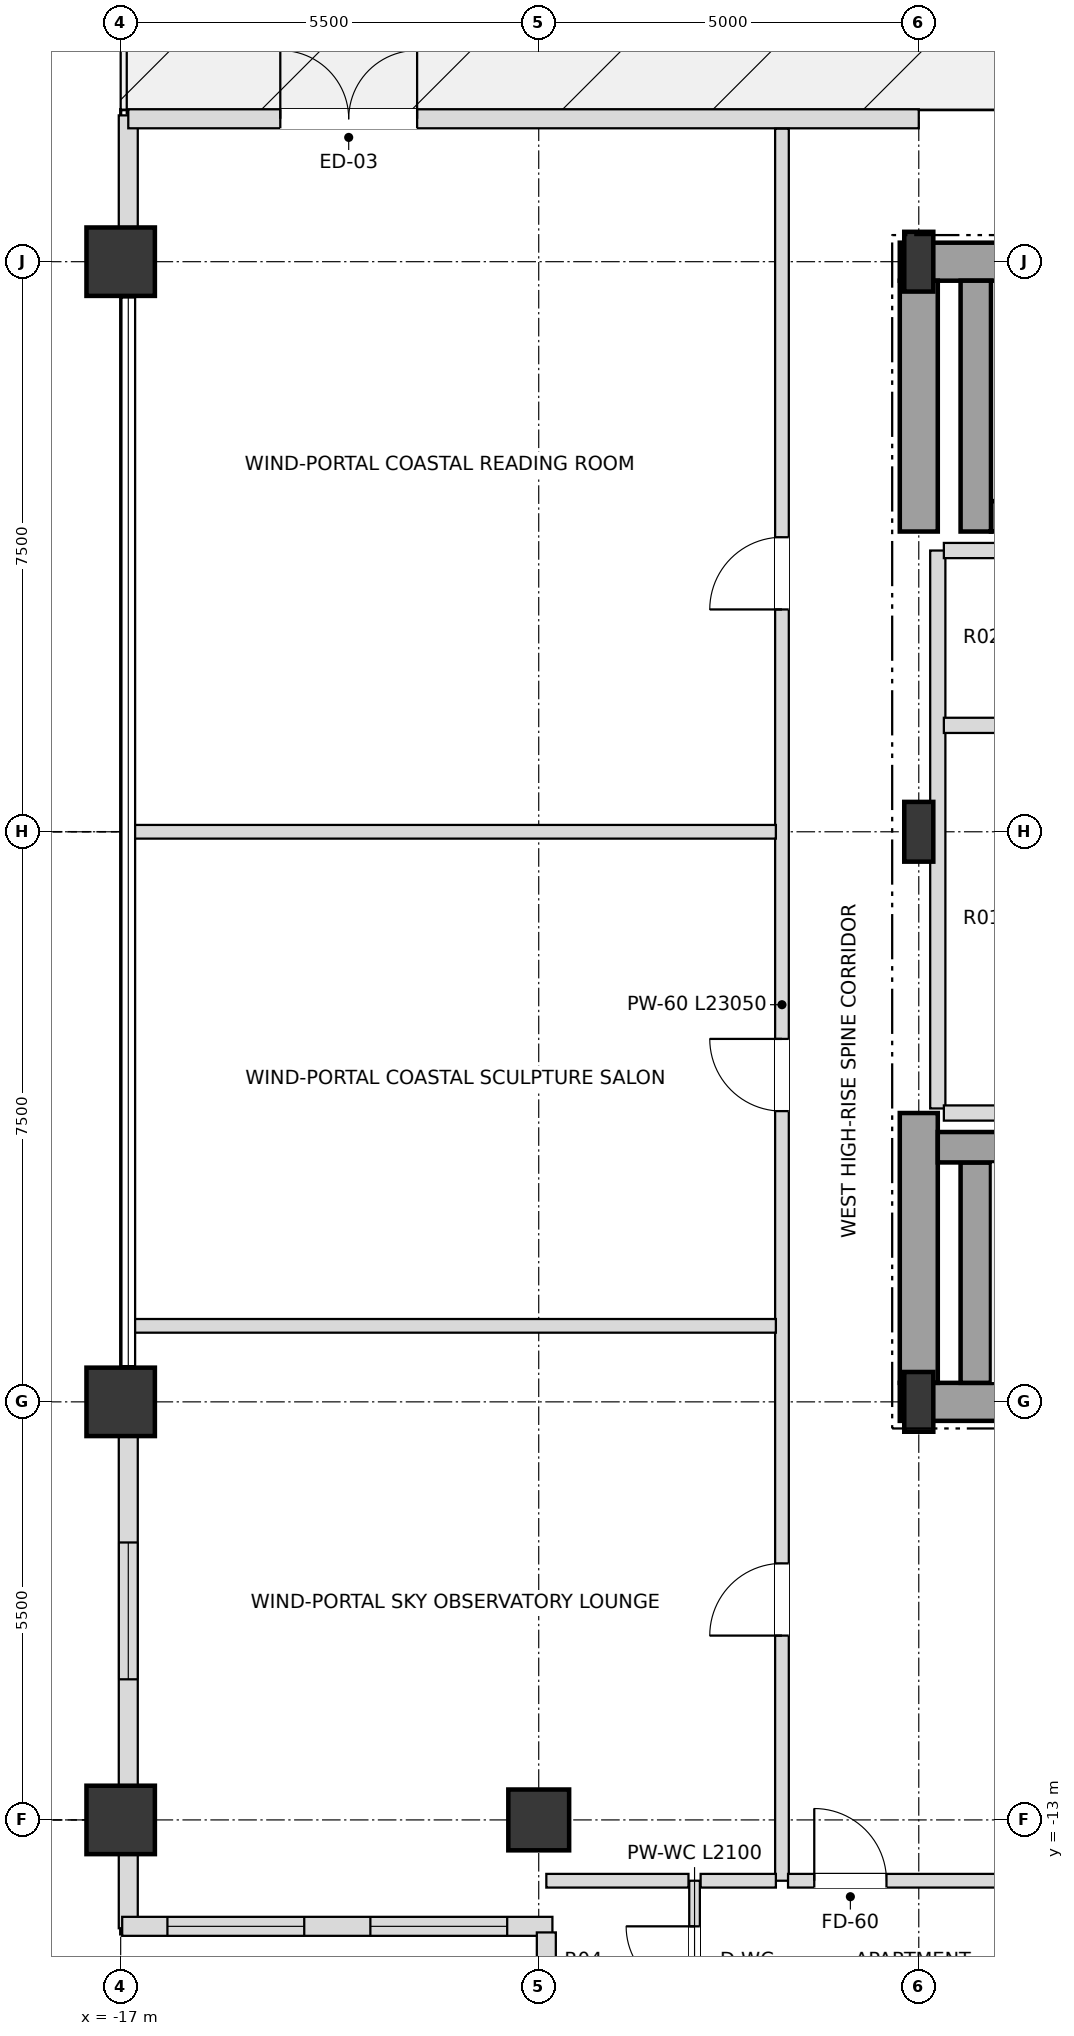
"""IFC4 building model, lengths in metres.
Left out: names, types, materials, properties, quantities, classifications, styles, units other than length and angle.
Written with IfcOpenShell. Run it as: python <this file> out.ifc"""

import sys

from ifc_helpers import new_model, si_unit, direction, frame, frame_2d, origin, origin_2d, place, context, subcontext, project, spatial, rectangle, i_section, extrude, element, fill, save


model = new_model("IFC4")
c1 = context("Model", 3, precision=1e-05, world=origin(), true_north=direction((0.0, 1.0)))
c2 = subcontext(c1, "Body", "Model", "MODEL_VIEW")
j1 = project(units=[si_unit("LENGTHUNIT", "METRE"), si_unit("PLANEANGLEUNIT", "RADIAN")], contexts=[c1])
p1 = place(None, origin())
s1 = spatial("IfcSite", under=j1, at=p1, CompositionType="ELEMENT")
p2 = place(p1, origin())
s2 = spatial("IfcBuilding", under=s1, at=p2, CompositionType="ELEMENT")
p3 = place(p2, frame((0.0, 0.0, 261.9)))
s3 = spatial("IfcBuildingStorey", under=s2, at=p3, CompositionType="ELEMENT", Elevation=261.9)
for number, where, z_axis, x_axis in (
    (1, (-6.5, -7.5, 0.0), (0.0, 0.0, 1.0), (1.0, 0.0, 0.0)),
    (2, (-6.5, 0.0, 0.0), (0.0, 0.0, 1.0), (1.0, 0.0, 0.0)),
    (3, (-6.5, 7.5, 0.0), (0.0, 0.0, 1.0), (1.0, 0.0, 0.0)),
):
    element("IfcColumn", number, at=place(p3, frame(where, z_axis=z_axis, x_axis=x_axis)), inside=s3, PredefinedType="COLUMN", context=c2, shape_type="SweptSolid", body=[
        extrude(i_section(OverallWidth=0.382, OverallDepth=0.786, WebThickness=0.02, FlangeThickness=0.033, at=origin_2d()), origin(), (0.0, 0.0, 1.0), 3.6),
    ])
for number, where, z_axis, x_axis in (
    (4, (-17.0, 7.5, 0.0), (0.0, 0.0, 1.0), (1.0, 0.0, 0.0)),
    (5, (-17.0, -7.5, 0.0), (0.0, 0.0, 1.0), (1.0, 0.0, 0.0)),
    (6, (-17.0, -13.0, 0.0), (0.0, 0.0, 1.0), (1.0, 0.0, 0.0)),
):
    element("IfcColumn", number, at=place(p3, frame(where, z_axis=z_axis, x_axis=x_axis)), inside=s3, PredefinedType="USERDEFINED", context=c2, shape_type="SweptSolid", body=[
        extrude(rectangle(XDim=0.9, YDim=0.9, at=origin_2d()), origin(), (0.0, 0.0, 1.0), 3.6),
    ])
p4 = place(p3, frame((-11.5, -13.0, 0.0), z_axis=(0.0, 0.0, 1.0), x_axis=(1.0, 0.0, 0.0)))
e7 = element("IfcColumn", 7, at=p4, inside=s3, PredefinedType="COLUMN", context=c2, shape_type="SweptSolid", body=[
    extrude(rectangle(XDim=0.8, YDim=0.8, at=origin_2d()), origin(), (0.0, 0.0, 1.0), 3.6),
])
p5 = place(p3, frame((-16.9, 9.425, 0.0), z_axis=(0.0, 0.0, 1.0), x_axis=(0.0, -1.0, 0.0)))
e8 = element("IfcWall", 8, at=p5, inside=s3, PredefinedType="SOLIDWALL", context=c2, shape_type="SweptSolid", body=[
    extrude(rectangle(XDim=1.48, YDim=0.25, at=frame_2d((0.74, 0.0))), origin(), (0.0, 0.0, 1.0), 2.748),
])
p6 = place(p3, frame((-16.9, -7.945, 0.0), z_axis=(0.0, 0.0, 1.0), x_axis=(0.0, -1.0, 0.0)))
e9 = element("IfcWall", 9, at=p6, inside=s3, PredefinedType="SOLIDWALL", context=c2, shape_type="SweptSolid", body=[
    extrude(rectangle(XDim=4.61, YDim=0.25, at=frame_2d((2.305, 0.0))), origin(), (0.0, 0.0, 1.0), 2.748),
])
p7 = place(p6, frame((1.405, 0.0, 0.72)))
e10 = element("IfcOpeningElement", 10, at=p7, cuts=e9, PredefinedType="OPENING", context=c2, shape_type="SweptSolid", body=[
    extrude(rectangle(XDim=1.8, YDim=1.68, at=frame_2d((0.9, 0.84))), frame((0.0, 0.135, 0.0), z_axis=(0.0, -1.0, 0.0), x_axis=(1.0, 0.0, 0.0)), (0.0, 0.0, 1.0), 0.27),
])
p8 = place(p3, frame((-16.9, -13.445, 0.0), z_axis=(0.0, 0.0, 1.0), x_axis=(0.0, -1.0, 0.0)))
e11 = element("IfcWall", 11, at=p8, inside=s3, PredefinedType="SOLIDWALL", context=c2, shape_type="SweptSolid", body=[
    extrude(rectangle(XDim=0.98, YDim=0.25, at=frame_2d((0.49, 0.0))), origin(), (0.0, 0.0, 1.0), 2.748),
])
p9 = place(p3, frame((-16.9, 9.38, 0.0), z_axis=(0.0, 0.0, 1.0), x_axis=(1.0, 0.0, 0.0)))
e12 = element("IfcWall", 12, at=p9, inside=s3, PredefinedType="SOLIDWALL", context=c2, shape_type="SweptSolid", body=[
    extrude(rectangle(XDim=10.4, YDim=0.25, at=frame_2d((5.2, 0.0))), origin(), (0.0, 0.0, 1.0), 3.38),
])
p10 = place(p9, frame((2.0, 0.0, 0.0)))
e13 = element("IfcOpeningElement", 13, at=p10, cuts=e12, PredefinedType="OPENING", context=c2, shape_type="SweptSolid", body=[
    extrude(rectangle(XDim=1.8, YDim=2.3, at=frame_2d((0.9, 1.15))), frame((0.0, 0.135, 0.0), z_axis=(0.0, -1.0, 0.0), x_axis=(1.0, 0.0, 0.0)), (0.0, 0.0, 1.0), 0.27),
])
p11 = place(p3, frame((-16.98, -14.4, 0.0), z_axis=(0.0, 0.0, 1.0), x_axis=(1.0, 0.0, 0.0)))
e14 = element("IfcWall", 14, at=p11, inside=s3, PredefinedType="SOLIDWALL", context=c2, shape_type="SweptSolid", body=[
    extrude(rectangle(XDim=5.66, YDim=0.25, at=frame_2d((2.83, 0.0))), origin(), (0.0, 0.0, 1.0), 2.748),
])
p12 = place(p11, frame((0.595, 0.0, 0.72)))
e15 = element("IfcOpeningElement", 15, at=p12, cuts=e14, PredefinedType="OPENING", context=c2, shape_type="SweptSolid", body=[
    extrude(rectangle(XDim=1.8, YDim=1.68, at=frame_2d((0.9, 0.84))), frame((0.0, 0.135, 0.0), z_axis=(0.0, -1.0, 0.0), x_axis=(1.0, 0.0, 0.0)), (0.0, 0.0, 1.0), 0.27),
])
p13 = place(p11, frame((3.265, 0.0, 0.72)))
e16 = element("IfcOpeningElement", 16, at=p13, cuts=e14, PredefinedType="OPENING", context=c2, shape_type="SweptSolid", body=[
    extrude(rectangle(XDim=1.8, YDim=1.68, at=frame_2d((0.9, 0.84))), frame((0.0, 0.135, 0.0), z_axis=(0.0, -1.0, 0.0), x_axis=(1.0, 0.0, 0.0)), (0.0, 0.0, 1.0), 0.27),
])
p14 = place(p3, frame((-11.4, -14.48, 0.0), z_axis=(0.0, 0.0, 1.0), x_axis=(0.0, -1.0, 0.0)))
e17 = element("IfcWall", 17, at=p14, inside=s3, PredefinedType="SOLIDWALL", context=c2, shape_type="SweptSolid", body=[
    extrude(rectangle(XDim=5.34, YDim=0.25, at=frame_2d((2.67, 0.0))), origin(), (0.0, 0.0, 1.0), 2.748),
])
p15 = place(p14, frame((0.33, 0.0, 0.72)))
e18 = element("IfcOpeningElement", 18, at=p15, cuts=e17, PredefinedType="OPENING", context=c2, shape_type="SweptSolid", body=[
    extrude(rectangle(XDim=0.76, YDim=1.68, at=frame_2d((0.38, 0.84))), frame((0.0, 0.135, 0.0), z_axis=(0.0, -1.0, 0.0), x_axis=(1.0, 0.0, 0.0)), (0.0, 0.0, 1.0), 0.27),
])
p16 = place(p14, frame((2.325, 0.0, 0.72)))
e19 = element("IfcOpeningElement", 19, at=p16, cuts=e17, PredefinedType="OPENING", context=c2, shape_type="SweptSolid", body=[
    extrude(rectangle(XDim=1.8, YDim=1.68, at=frame_2d((0.9, 0.84))), frame((0.0, 0.135, 0.0), z_axis=(0.0, -1.0, 0.0), x_axis=(1.0, 0.0, 0.0)), (0.0, 0.0, 1.0), 0.27),
])
p17 = place(p3, frame((-6.75, -7.5, 0.0), z_axis=(0.0, 0.0, 1.0), x_axis=(1.0, 0.0, 0.0)))
e20 = element("IfcWall", 20, at=p17, inside=s3, PredefinedType="SHEAR", context=c2, shape_type="SweptSolid", body=[
    extrude(rectangle(XDim=6.75, YDim=0.5, at=frame_2d((3.375, 0.0))), origin(), (0.0, 0.0, 1.0), 3.38),
])
p18 = place(p3, frame((-6.75, 7.5, 0.0), z_axis=(0.0, 0.0, 1.0), x_axis=(1.0, 0.0, 0.0)))
e21 = element("IfcWall", 21, at=p18, inside=s3, PredefinedType="SHEAR", context=c2, shape_type="SweptSolid", body=[
    extrude(rectangle(XDim=6.75, YDim=0.5, at=frame_2d((3.375, 0.0))), origin(), (0.0, 0.0, 1.0), 3.38),
])
p19 = place(p18, frame((1.65, 0.0, 0.0)))
e22 = element("IfcOpeningElement", 22, at=p19, cuts=e21, PredefinedType="OPENING", context=c2, shape_type="SweptSolid", body=[
    extrude(rectangle(XDim=1.05, YDim=2.15, at=frame_2d((0.525, 1.075))), frame((0.0, 0.26, 0.0), z_axis=(0.0, -1.0, 0.0), x_axis=(1.0, 0.0, 0.0)), (0.0, 0.0, 1.0), 0.52),
])
p20 = place(p3, frame((-6.5, -7.25, 0.0), z_axis=(0.0, 0.0, 1.0), x_axis=(0.0, 1.0, 0.0)))
e23 = element("IfcWall", 23, at=p20, inside=s3, PredefinedType="SHEAR", context=c2, shape_type="SweptSolid", body=[
    extrude(rectangle(XDim=3.55, YDim=0.5, at=frame_2d((1.775, 0.0))), origin(), (0.0, 0.0, 1.0), 3.38),
])
p21 = place(p3, frame((-6.5, 3.95, 0.0), z_axis=(0.0, 0.0, 1.0), x_axis=(0.0, 1.0, 0.0)))
e24 = element("IfcWall", 24, at=p21, inside=s3, PredefinedType="SHEAR", context=c2, shape_type="SweptSolid", body=[
    extrude(rectangle(XDim=3.3, YDim=0.5, at=frame_2d((1.65, 0.0))), origin(), (0.0, 0.0, 1.0), 3.38),
])
p22 = place(p3, frame((-5.75, -7.25, 0.0), z_axis=(0.0, 0.0, 1.0), x_axis=(0.0, 1.0, 0.0)))
e25 = element("IfcWall", 25, at=p22, inside=s3, PredefinedType="SHEAR", context=c2, shape_type="SweptSolid", body=[
    extrude(rectangle(XDim=2.9, YDim=0.4, at=frame_2d((1.45, 0.0))), origin(), (0.0, 0.0, 1.0), 3.38),
])
p23 = place(p3, frame((-6.25, -4.15, 0.0), z_axis=(0.0, 0.0, 1.0), x_axis=(1.0, 0.0, 0.0)))
e26 = element("IfcWall", 26, at=p23, inside=s3, PredefinedType="SHEAR", context=c2, shape_type="SweptSolid", body=[
    extrude(rectangle(XDim=7.78, YDim=0.4, at=frame_2d((3.89, 0.0))), origin(), (0.0, 0.0, 1.0), 3.38),
])
p24 = place(p3, frame((-5.55, 4.15, 0.0), z_axis=(0.0, 0.0, 1.0), x_axis=(1.0, 0.0, 0.0)))
e27 = element("IfcWall", 27, at=p24, inside=s3, PredefinedType="SHEAR", context=c2, shape_type="SweptSolid", body=[
    extrude(rectangle(XDim=7.08, YDim=0.4, at=frame_2d((3.54, 0.0))), origin(), (0.0, 0.0, 1.0), 3.38),
])
p25 = place(p3, frame((-5.75, 3.95, 0.0), z_axis=(0.0, 0.0, 1.0), x_axis=(0.0, 1.0, 0.0)))
e28 = element("IfcWall", 28, at=p25, inside=s3, PredefinedType="SHEAR", context=c2, shape_type="SweptSolid", body=[
    extrude(rectangle(XDim=3.3, YDim=0.4, at=frame_2d((1.65, 0.0))), origin(), (0.0, 0.0, 1.0), 3.38),
])
p26 = place(p3, frame((-9.45, -15.9, 0.0), z_axis=(0.0, 0.0, 1.0), x_axis=(0.0, 1.0, 0.0)))
e29 = element("IfcWall", 29, at=p26, inside=s3, PredefinedType="PARTITIONING", context=c2, shape_type="SweptSolid", body=[
    extrude(rectangle(XDim=2.1, YDim=0.14, at=frame_2d((1.05, 0.0))), origin(), (0.0, 0.0, 1.0), 3.38),
])
p27 = place(p26, frame((0.6, 0.0, 0.0)))
e30 = element("IfcOpeningElement", 30, at=p27, cuts=e29, PredefinedType="OPENING", context=c2, shape_type="SweptSolid", body=[
    extrude(rectangle(XDim=0.9, YDim=2.1, at=frame_2d((0.45, 1.05))), frame((0.0, 0.08, 0.0), z_axis=(0.0, -1.0, 0.0), x_axis=(1.0, 0.0, 0.0)), (0.0, 0.0, 1.0), 0.16),
])
p28 = place(p3, frame((-8.3, -13.8, 0.0), z_axis=(0.0, 0.0, 1.0), x_axis=(0.0, 1.0, 0.0)))
e31 = element("IfcWall", 31, at=p28, inside=s3, PredefinedType="PARTITIONING", context=c2, shape_type="SweptSolid", body=[
    extrude(rectangle(XDim=23.05, YDim=0.18, at=frame_2d((11.525, 0.0))), origin(), (0.0, 0.0, 1.0), 2.826),
])
p29 = place(p28, frame((3.225, 0.0, 0.0)))
e32 = element("IfcOpeningElement", 32, at=p29, cuts=e31, PredefinedType="OPENING", context=c2, shape_type="SweptSolid", body=[
    extrude(rectangle(XDim=0.95, YDim=2.15, at=frame_2d((0.475, 1.075))), frame((0.0, 0.1, 0.0), z_axis=(0.0, -1.0, 0.0), x_axis=(1.0, 0.0, 0.0)), (0.0, 0.0, 1.0), 0.2),
])
p30 = place(p28, frame((10.125, 0.0, 0.0)))
e33 = element("IfcOpeningElement", 33, at=p30, cuts=e31, PredefinedType="OPENING", context=c2, shape_type="SweptSolid", body=[
    extrude(rectangle(XDim=0.95, YDim=2.15, at=frame_2d((0.475, 1.075))), frame((0.0, 0.1, 0.0), z_axis=(0.0, -1.0, 0.0), x_axis=(1.0, 0.0, 0.0)), (0.0, 0.0, 1.0), 0.2),
])
p31 = place(p28, frame((16.725, 0.0, 0.0)))
e34 = element("IfcOpeningElement", 34, at=p31, cuts=e31, PredefinedType="OPENING", context=c2, shape_type="SweptSolid", body=[
    extrude(rectangle(XDim=0.95, YDim=2.15, at=frame_2d((0.475, 1.075))), frame((0.0, 0.1, 0.0), z_axis=(0.0, -1.0, 0.0), x_axis=(1.0, 0.0, 0.0)), (0.0, 0.0, 1.0), 0.2),
])
p32 = place(p3, frame((-6.25, -3.64, 0.0), z_axis=(0.0, 0.0, 1.0), x_axis=(0.0, 1.0, 0.0)))
e35 = element("IfcWall", 35, at=p32, inside=s3, PredefinedType="SOLIDWALL", context=c2, shape_type="SweptSolid", body=[
    extrude(rectangle(XDim=7.34, YDim=0.2, at=frame_2d((3.67, 0.0))), origin(), (0.0, 0.0, 1.0), 3.38),
])
p33 = place(p3, frame((-11.4, -13.8, 0.0), z_axis=(0.0, 0.0, 1.0), x_axis=(1.0, 0.0, 0.0)))
e36 = element("IfcWall", 36, at=p33, inside=s3, PredefinedType="PARTITIONING", context=c2, shape_type="SweptSolid", body=[
    extrude(rectangle(XDim=1.87, YDim=0.18, at=frame_2d((0.935, 0.0))), origin(), (0.0, 0.0, 1.0), 3.38),
])
p34 = place(p3, frame((-9.37, -13.8, 0.0), z_axis=(0.0, 0.0, 1.0), x_axis=(1.0, 0.0, 0.0)))
e37 = element("IfcWall", 37, at=p34, inside=s3, PredefinedType="PARTITIONING", context=c2, shape_type="SweptSolid", body=[
    extrude(rectangle(XDim=0.99, YDim=0.18, at=frame_2d((0.495, 0.0))), origin(), (0.0, 0.0, 1.0), 3.38),
])
p35 = place(p3, frame((-8.22, -13.8, 0.0), z_axis=(0.0, 0.0, 1.0), x_axis=(1.0, 0.0, 0.0)))
e38 = element("IfcWall", 38, at=p35, inside=s3, PredefinedType="PARTITIONING", context=c2, shape_type="SweptSolid", body=[
    extrude(rectangle(XDim=4.44, YDim=0.18, at=frame_2d((2.22, 0.0))), origin(), (0.0, 0.0, 1.0), 2.826),
])
p36 = place(p35, frame((0.345, 0.0, 0.0)))
e39 = element("IfcOpeningElement", 39, at=p36, cuts=e38, PredefinedType="OPENING", context=c2, shape_type="SweptSolid", body=[
    extrude(rectangle(XDim=0.95, YDim=2.15, at=frame_2d((0.475, 1.075))), frame((0.0, 0.1, 0.0), z_axis=(0.0, -1.0, 0.0), x_axis=(1.0, 0.0, 0.0)), (0.0, 0.0, 1.0), 0.2),
])
p37 = place(p3, frame((-16.82, -6.5, 0.0), z_axis=(0.0, 0.0, 1.0), x_axis=(1.0, 0.0, 0.0)))
e40 = element("IfcWall", 40, at=p37, inside=s3, PredefinedType="PARTITIONING", context=c2, shape_type="SweptSolid", body=[
    extrude(rectangle(XDim=8.44, YDim=0.18, at=frame_2d((4.22, 0.0))), origin(), (0.0, 0.0, 1.0), 3.018),
])
p38 = place(p3, frame((-6.17, -3.7, 0.0), z_axis=(0.0, 0.0, 1.0), x_axis=(1.0, 0.0, 0.0)))
e41 = element("IfcWall", 41, at=p38, inside=s3, PredefinedType="SOLIDWALL", context=c2, shape_type="SweptSolid", body=[
    extrude(rectangle(XDim=1.94, YDim=0.2, at=frame_2d((0.97, 0.0))), origin(), (0.0, 0.0, 1.0), 3.38),
])
p39 = place(p3, frame((-16.82, 0.0, 0.0), z_axis=(0.0, 0.0, 1.0), x_axis=(1.0, 0.0, 0.0)))
e42 = element("IfcWall", 42, at=p39, inside=s3, PredefinedType="PARTITIONING", context=c2, shape_type="SweptSolid", body=[
    extrude(rectangle(XDim=8.44, YDim=0.18, at=frame_2d((4.22, 0.0))), origin(), (0.0, 0.0, 1.0), 3.018),
])
for number, where, z_axis, x_axis in (
    (43, (-6.17, 1.4, 0.0), (0.0, 0.0, 1.0), (1.0, 0.0, 0.0)),
    (44, (-6.17, 3.7, 0.0), (0.0, 0.0, 1.0), (1.0, 0.0, 0.0)),
):
    element("IfcWall", number, at=place(p3, frame(where, z_axis=z_axis, x_axis=x_axis)), inside=s3, PredefinedType="SOLIDWALL", context=c2, shape_type="SweptSolid", body=[
        extrude(rectangle(XDim=1.94, YDim=0.2, at=frame_2d((0.97, 0.0))), origin(), (0.0, 0.0, 1.0), 3.38),
    ])
p40 = place(p7, origin())
e45 = element("IfcWindow", 45, at=p40, inside=s3, PartitioningType="SINGLE_PANEL", PredefinedType="WINDOW", context=c2, shape_type="SweptSolid", body=[
    extrude(rectangle(XDim=1.8, YDim=1.68, at=frame_2d((0.9, 0.84))), frame((0.0, 0.03, 0.0), z_axis=(0.0, -1.0, 0.0), x_axis=(1.0, 0.0, 0.0)), (0.0, 0.0, 1.0), 0.06),
])
fill(e10, e45)
p41 = place(p10, origin())
e46 = element("IfcDoor", 46, at=p41, inside=s3, OperationType="DOUBLE_DOOR_SINGLE_SWING", PredefinedType="DOOR", context=c2, shape_type="SweptSolid", body=[
    extrude(rectangle(XDim=1.8, YDim=2.3, at=frame_2d((0.9, 1.15))), frame((0.0, 0.025, 0.0), z_axis=(0.0, -1.0, 0.0), x_axis=(1.0, 0.0, 0.0)), (0.0, 0.0, 1.0), 0.05),
])
fill(e13, e46)
p42 = place(p12, origin())
e47 = element("IfcWindow", 47, at=p42, inside=s3, PartitioningType="SINGLE_PANEL", PredefinedType="WINDOW", context=c2, shape_type="SweptSolid", body=[
    extrude(rectangle(XDim=1.8, YDim=1.68, at=frame_2d((0.9, 0.84))), frame((0.0, 0.03, 0.0), z_axis=(0.0, -1.0, 0.0), x_axis=(1.0, 0.0, 0.0)), (0.0, 0.0, 1.0), 0.06),
])
fill(e15, e47)
p43 = place(p13, origin())
e48 = element("IfcWindow", 48, at=p43, inside=s3, PartitioningType="SINGLE_PANEL", PredefinedType="WINDOW", context=c2, shape_type="SweptSolid", body=[
    extrude(rectangle(XDim=1.8, YDim=1.68, at=frame_2d((0.9, 0.84))), frame((0.0, 0.03, 0.0), z_axis=(0.0, -1.0, 0.0), x_axis=(1.0, 0.0, 0.0)), (0.0, 0.0, 1.0), 0.06),
])
fill(e16, e48)
p44 = place(p27, origin())
e49 = element("IfcDoor", 49, at=p44, inside=s3, OperationType="SINGLE_SWING_RIGHT", PredefinedType="DOOR", context=c2, shape_type="SweptSolid", body=[
    extrude(rectangle(XDim=0.9, YDim=2.1, at=frame_2d((0.45, 1.05))), frame((0.0, 0.025, 0.0), z_axis=(0.0, -1.0, 0.0), x_axis=(1.0, 0.0, 0.0)), (0.0, 0.0, 1.0), 0.05),
])
fill(e30, e49)
p45 = place(p36, origin())
e50 = element("IfcDoor", 50, at=p45, inside=s3, OperationType="SINGLE_SWING_LEFT", PredefinedType="DOOR", context=c2, shape_type="SweptSolid", body=[
    extrude(rectangle(XDim=0.95, YDim=2.15, at=frame_2d((0.475, 1.075))), frame((0.0, 0.025, 0.0), z_axis=(0.0, -1.0, 0.0), x_axis=(1.0, 0.0, 0.0)), (0.0, 0.0, 1.0), 0.05),
])
fill(e39, e50)
p46 = place(p29, origin())
e51 = element("IfcDoor", 51, at=p46, inside=s3, OperationType="SINGLE_SWING_LEFT", PredefinedType="DOOR", context=c2, shape_type="SweptSolid", body=[
    extrude(rectangle(XDim=0.95, YDim=2.15, at=frame_2d((0.475, 1.075))), frame((0.0, 0.025, 0.0), z_axis=(0.0, -1.0, 0.0), x_axis=(1.0, 0.0, 0.0)), (0.0, 0.0, 1.0), 0.05),
])
fill(e32, e51)
p47 = place(p30, origin())
e52 = element("IfcDoor", 52, at=p47, inside=s3, OperationType="SINGLE_SWING_RIGHT", PredefinedType="DOOR", context=c2, shape_type="SweptSolid", body=[
    extrude(rectangle(XDim=0.95, YDim=2.15, at=frame_2d((0.475, 1.075))), frame((0.0, 0.025, 0.0), z_axis=(0.0, -1.0, 0.0), x_axis=(1.0, 0.0, 0.0)), (0.0, 0.0, 1.0), 0.05),
])
fill(e33, e52)
p48 = place(p31, origin())
e53 = element("IfcDoor", 53, at=p48, inside=s3, OperationType="SINGLE_SWING_LEFT", PredefinedType="DOOR", context=c2, shape_type="SweptSolid", body=[
    extrude(rectangle(XDim=0.95, YDim=2.15, at=frame_2d((0.475, 1.075))), frame((0.0, 0.025, 0.0), z_axis=(0.0, -1.0, 0.0), x_axis=(1.0, 0.0, 0.0)), (0.0, 0.0, 1.0), 0.05),
])
fill(e34, e53)
save(model, sys.argv[1])
